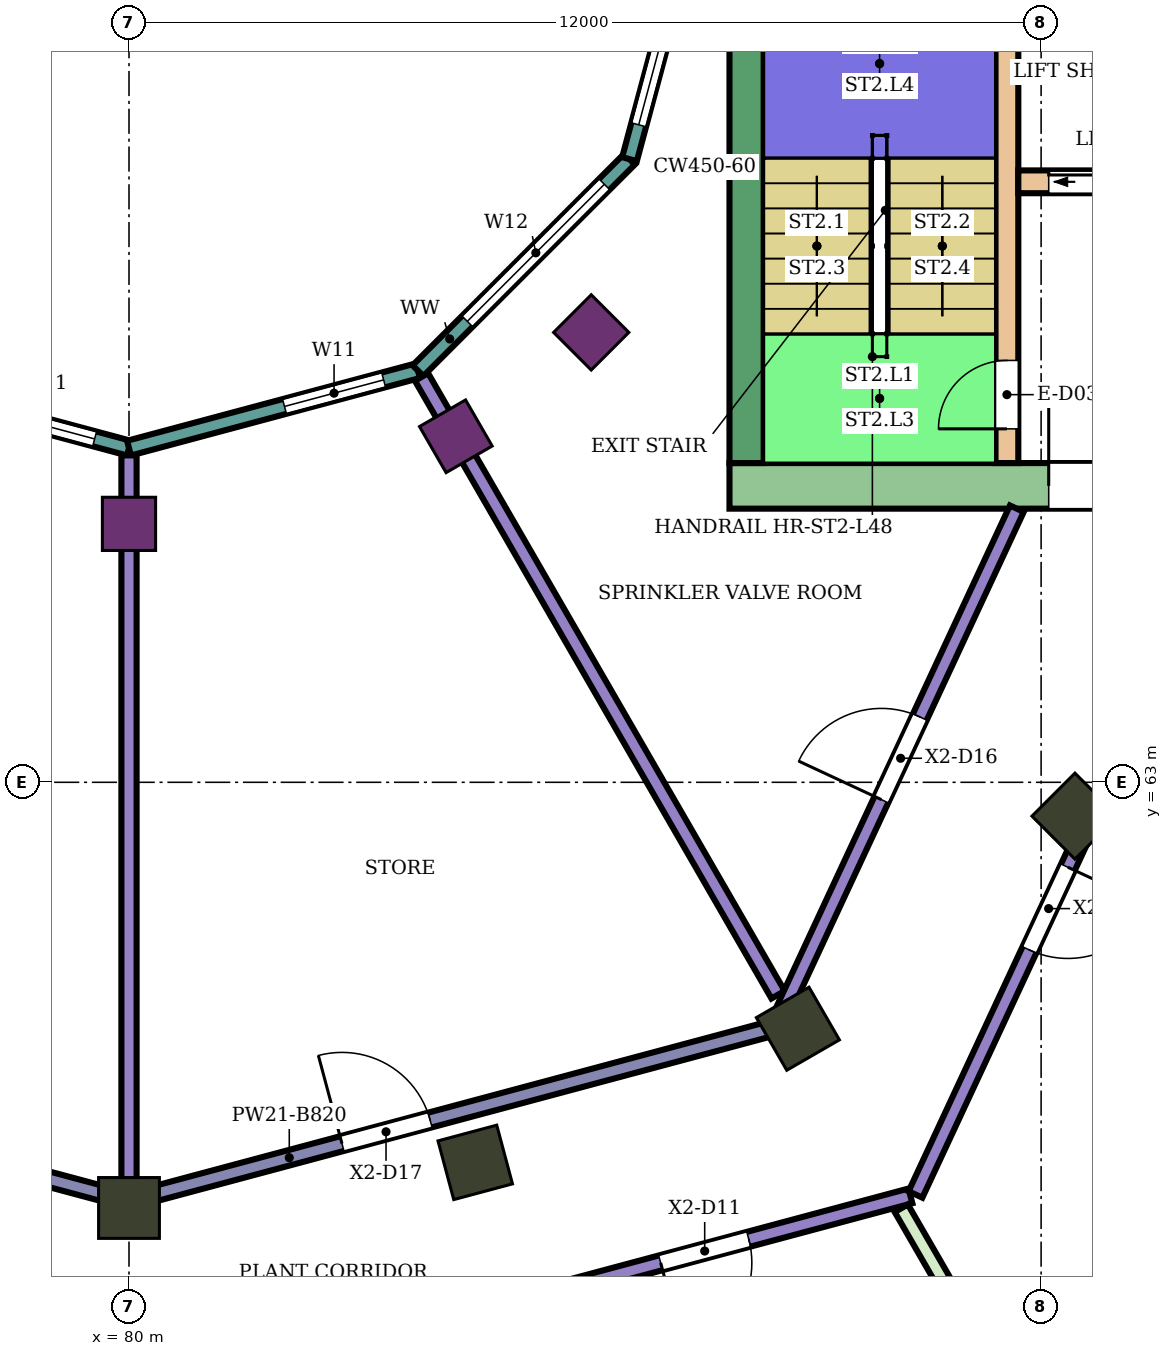
"""IFC4 building model, lengths in metres.
Left out: names, types, materials, properties, quantities, classifications, styles, units other than length and angle.
Written with IfcOpenShell. Run it as: python <this file> out.ifc"""

import sys

from ifc_helpers import new_model, si_unit, direction, frame, frame_2d, origin, origin_2d, place, context, subcontext, project, spatial, rectangle, extrude, element, fill, save


model = new_model("IFC4")
c1 = context("Model", 3, precision=1e-05, world=origin(), true_north=direction((0.0, 1.0)))
c2 = subcontext(c1, "Body", "Model", "MODEL_VIEW")
j1 = project(units=[si_unit("LENGTHUNIT", "METRE"), si_unit("PLANEANGLEUNIT", "RADIAN")], contexts=[c1])
p1 = place(None, origin())
s1 = spatial("IfcSite", under=j1, at=p1, CompositionType="ELEMENT")
p2 = place(p1, origin())
s2 = spatial("IfcBuilding", under=s1, at=p2, CompositionType="ELEMENT")
p3 = place(p2, frame((0.0, 0.0, 206.9)))
s3 = spatial("IfcBuildingStorey", under=s2, at=p3, CompositionType="ELEMENT", Elevation=206.9)
for number, where, z_axis, x_axis in (
    (1, (80.0, 57.4, 0.0), (0.0, 0.0, 1.0), (0.0, -1.0, 0.0)),
    (2, (84.555, 58.0, 0.0), (0.0, 0.0, 1.0), (0.259, -0.966, 0.0)),
    (3, (88.8, 59.758, 0.0), (0.0, 0.0, 1.0), (0.5, -0.866, 0.0)),
    (4, (92.445, 62.555, 0.0), (0.0, 0.0, 1.0), (0.707, -0.707, 0.0)),
):
    element("IfcColumn", number, at=place(p3, frame(where, z_axis=z_axis, x_axis=x_axis)), inside=s3, PredefinedType="COLUMN", context=c2, shape_type="SweptSolid", body=[
        extrude(rectangle(XDim=0.8, YDim=0.8, at=origin_2d()), origin(), (0.0, 0.0, 1.0), 5.6),
    ])
for number, where, z_axis, x_axis in (
    (5, (80.0, 66.4, 0.0), (0.0, 0.0, 1.0), (0.0, -1.0, 0.0)),
    (6, (84.3, 67.552, 0.0), (0.0, 0.0, 1.0), (0.5, -0.866, 0.0)),
    (7, (86.081, 68.919, 0.0), (0.0, 0.0, 1.0), (0.707, -0.707, 0.0)),
):
    element("IfcColumn", number, at=place(p3, frame(where, z_axis=z_axis, x_axis=x_axis)), inside=s3, PredefinedType="COLUMN", context=c2, shape_type="SweptSolid", body=[
        extrude(rectangle(XDim=0.7, YDim=0.7, at=origin_2d()), origin(), (0.0, 0.0, 1.0), 5.6),
    ])
p4 = place(p3, frame((87.9, 66.9, 0.0), z_axis=(0.0, 0.0, 1.0), x_axis=(1.0, 0.0, 0.0)))
e8 = element("IfcWall", 8, at=p4, inside=s3, PredefinedType="SHEAR", context=c2, shape_type="SweptSolid", body=[
    extrude(rectangle(XDim=14.9, YDim=0.6, at=frame_2d((7.45, 0.0))), origin(), (0.0, 0.0, 1.0), 5.28),
])
p5 = place(p4, frame((4.2, 0.0, 0.0)))
e9 = element("IfcOpeningElement", 9, at=p5, cuts=e8, PredefinedType="OPENING", context=c2, shape_type="SweptSolid", body=[
    extrude(rectangle(XDim=2.4, YDim=2.4, at=frame_2d((1.2, 1.2))), frame((0.0, 0.31, 0.0), z_axis=(0.0, -1.0, 0.0), x_axis=(1.0, 0.0, 0.0)), (0.0, 0.0, 1.0), 0.62),
])
p6 = place(p3, frame((88.125, 67.2, 0.0), z_axis=(0.0, 0.0, 1.0), x_axis=(0.0, 1.0, 0.0)))
e10 = element("IfcWall", 10, at=p6, inside=s3, PredefinedType="SHEAR", context=c2, shape_type="SweptSolid", body=[
    extrude(rectangle(XDim=7.8, YDim=0.45, at=frame_2d((3.9, 0.0))), origin(), (0.0, 0.0, 1.0), 5.28),
])
p7 = place(p3, frame((91.55, 67.2, 0.0), z_axis=(0.0, 0.0, 1.0), x_axis=(0.0, 1.0, 0.0)))
e11 = element("IfcWall", 11, at=p7, inside=s3, PredefinedType="SHEAR", context=c2, shape_type="SweptSolid", body=[
    extrude(rectangle(XDim=7.8, YDim=0.3, at=frame_2d((3.9, 0.0))), origin(), (0.0, 0.0, 1.0), 5.28),
])
p8 = place(p7, frame((0.45, 0.0, 0.0)))
e12 = element("IfcOpeningElement", 12, at=p8, cuts=e11, PredefinedType="OPENING", context=c2, shape_type="SweptSolid", body=[
    extrude(rectangle(XDim=0.9, YDim=2.1, at=frame_2d((0.45, 1.05))), frame((0.0, 0.16, 0.0), z_axis=(0.0, -1.0, 0.0), x_axis=(1.0, 0.0, 0.0)), (0.0, 0.0, 1.0), 0.32),
])
p9 = place(p3, frame((91.7, 70.9, 0.0), z_axis=(0.0, 0.0, 1.0), x_axis=(1.0, 0.0, 0.0)))
e13 = element("IfcWall", 13, at=p9, inside=s3, PredefinedType="SHEAR", context=c2, shape_type="SweptSolid", body=[
    extrude(rectangle(XDim=11.1, YDim=0.3, at=frame_2d((5.55, 0.0))), origin(), (0.0, 0.0, 1.0), 5.28),
])
p10 = place(p9, frame((0.4, 0.0, 0.0)))
e14 = element("IfcOpeningElement", 14, at=p10, cuts=e13, PredefinedType="OPENING", context=c2, shape_type="SweptSolid", body=[
    extrude(rectangle(XDim=1.4, YDim=2.1, at=frame_2d((0.7, 1.05))), frame((0.0, 0.16, 0.0), z_axis=(0.0, -1.0, 0.0), x_axis=(1.0, 0.0, 0.0)), (0.0, 0.0, 1.0), 0.32),
])
p11 = place(p9, frame((3.0, 0.0, 0.0)))
e15 = element("IfcOpeningElement", 15, at=p11, cuts=e13, PredefinedType="OPENING", context=c2, shape_type="SweptSolid", body=[
    extrude(rectangle(XDim=1.2, YDim=2.1, at=frame_2d((0.6, 1.05))), frame((0.0, 0.16, 0.0), z_axis=(0.0, -1.0, 0.0), x_axis=(1.0, 0.0, 0.0)), (0.0, 0.0, 1.0), 0.32),
])
p12 = place(p9, frame((6.075, 0.0, 0.0)))
e16 = element("IfcOpeningElement", 16, at=p12, cuts=e13, PredefinedType="OPENING", context=c2, shape_type="SweptSolid", body=[
    extrude(rectangle(XDim=0.9, YDim=2.1, at=frame_2d((0.45, 1.05))), frame((0.0, 0.16, 0.0), z_axis=(0.0, -1.0, 0.0), x_axis=(1.0, 0.0, 0.0)), (0.0, 0.0, 1.0), 0.32),
])
p13 = place(p9, frame((9.125, 0.0, 0.0)))
e17 = element("IfcOpeningElement", 17, at=p13, cuts=e13, PredefinedType="OPENING", context=c2, shape_type="SweptSolid", body=[
    extrude(rectangle(XDim=0.9, YDim=2.1, at=frame_2d((0.45, 1.05))), frame((0.0, 0.16, 0.0), z_axis=(0.0, -1.0, 0.0), x_axis=(1.0, 0.0, 0.0)), (0.0, 0.0, 1.0), 0.32),
])
p14 = place(p3, frame((76.198, 68.415, 0.0), z_axis=(0.0, 0.0, 1.0), x_axis=(0.965933654434, -0.258789828301, 0.0)))
e18 = element("IfcWall", 18, at=p14, inside=s3, PredefinedType="NOTDEFINED", context=c2, shape_type="SweptSolid", body=[
    extrude(rectangle(XDim=3.936, YDim=0.2, at=frame_2d((1.968, 0.0))), origin(), (0.0, 0.0, 1.0), 5.6),
])
p15 = place(p14, frame((2.118, 0.0, 0.9)))
e19 = element("IfcOpeningElement", 19, at=p15, cuts=e18, PredefinedType="OPENING", context=c2, shape_type="SweptSolid", body=[
    extrude(rectangle(XDim=1.35, YDim=2.3, at=frame_2d((0.675, 1.15))), frame((0.0, 0.11, 0.0), z_axis=(0.0, -1.0, 0.0), x_axis=(1.0, 0.0, 0.0)), (0.0, 0.0, 1.0), 0.22),
])
p16 = place(p3, frame((80.0, 67.396, 0.0), z_axis=(0.0, 0.0, 1.0), x_axis=(0.965933654434, 0.258789828301, 0.0)))
e20 = element("IfcWall", 20, at=p16, inside=s3, PredefinedType="NOTDEFINED", context=c2, shape_type="SweptSolid", body=[
    extrude(rectangle(XDim=3.936, YDim=0.2, at=frame_2d((1.968, 0.0))), origin(), (0.0, 0.0, 1.0), 5.6),
])
p17 = place(p16, frame((2.118, 0.0, 0.9)))
e21 = element("IfcOpeningElement", 21, at=p17, cuts=e20, PredefinedType="OPENING", context=c2, shape_type="SweptSolid", body=[
    extrude(rectangle(XDim=1.35, YDim=2.3, at=frame_2d((0.675, 1.15))), frame((0.0, 0.11, 0.0), z_axis=(0.0, -1.0, 0.0), x_axis=(1.0, 0.0, 0.0)), (0.0, 0.0, 1.0), 0.22),
])
p18 = place(p3, frame((83.802, 68.415, 0.0), z_axis=(0.0, 0.0, 1.0), x_axis=(0.707106781187, 0.707106781187, 0.0)))
e22 = element("IfcWall", 22, at=p18, inside=s3, PredefinedType="NOTDEFINED", context=c2, shape_type="SweptSolid", body=[
    extrude(rectangle(XDim=3.936, YDim=0.2, at=frame_2d((1.968, 0.0))), origin(), (0.0, 0.0, 1.0), 5.6),
])
p19 = place(p18, frame((0.918, 0.0, 0.9)))
e23 = element("IfcOpeningElement", 23, at=p19, cuts=e22, PredefinedType="OPENING", context=c2, shape_type="SweptSolid", body=[
    extrude(rectangle(XDim=2.55, YDim=2.3, at=frame_2d((1.275, 1.15))), frame((0.0, 0.11, 0.0), z_axis=(0.0, -1.0, 0.0), x_axis=(1.0, 0.0, 0.0)), (0.0, 0.0, 1.0), 0.22),
])
p20 = place(p3, frame((86.585, 71.198, 0.0), z_axis=(0.0, 0.0, 1.0), x_axis=(0.258789828301, 0.965933654434, 0.0)))
e24 = element("IfcWall", 24, at=p20, inside=s3, PredefinedType="NOTDEFINED", context=c2, shape_type="SweptSolid", body=[
    extrude(rectangle(XDim=3.936, YDim=0.2, at=frame_2d((1.968, 0.0))), origin(), (0.0, 0.0, 1.0), 5.6),
])
p21 = place(p20, frame((0.468, 0.0, 0.9)))
e25 = element("IfcOpeningElement", 25, at=p21, cuts=e24, PredefinedType="OPENING", context=c2, shape_type="SweptSolid", body=[
    extrude(rectangle(XDim=3.0, YDim=2.3, at=frame_2d((1.5, 1.15))), frame((0.0, 0.11, 0.0), z_axis=(0.0, -1.0, 0.0), x_axis=(1.0, 0.0, 0.0)), (0.0, 0.0, 1.0), 0.22),
])
p22 = place(p3, frame((69.652, 57.577, 0.0), z_axis=(0.0, 0.0, 1.0), x_axis=(0.965914220364, -0.25886235512, 0.0)))
e26 = element("IfcWall", 26, at=p22, inside=s3, PredefinedType="PARTITIONING", context=c2, shape_type="SweptSolid", body=[
    extrude(rectangle(XDim=10.663, YDim=0.2, at=frame_2d((5.332, 0.0))), origin(), (0.0, 0.0, 1.0), 5.15),
])
p23 = place(p22, frame((7.54, 0.0, 0.0)))
e27 = element("IfcOpeningElement", 27, at=p23, cuts=e26, PredefinedType="OPENING", context=c2, shape_type="SweptSolid", body=[
    extrude(rectangle(XDim=1.1, YDim=2.1, at=frame_2d((0.55, 1.05))), frame((0.0, 0.11, 0.0), z_axis=(0.0, -1.0, 0.0), x_axis=(1.0, 0.0, 0.0)), (0.0, 0.0, 1.0), 0.22),
])
p24 = place(p22, frame((2.272, 0.0, 0.0)))
e28 = element("IfcOpeningElement", 28, at=p24, cuts=e26, PredefinedType="OPENING", context=c2, shape_type="SweptSolid", body=[
    extrude(rectangle(XDim=1.2, YDim=2.4, at=frame_2d((0.6, 1.2))), frame((0.0, 0.11, 0.0), z_axis=(0.0, -1.0, 0.0), x_axis=(1.0, 0.0, 0.0)), (0.0, 0.0, 1.0), 0.22),
])
p25 = place(p3, frame((71.498, 59.774, 0.0), z_axis=(0.0, 0.0, 1.0), x_axis=(0.965928196674, -0.258810198543, 0.0)))
e29 = element("IfcWall", 29, at=p25, inside=s3, PredefinedType="PARTITIONING", context=c2, shape_type="SweptSolid", body=[
    extrude(rectangle(XDim=8.672, YDim=0.2, at=frame_2d((4.336, 0.0))), origin(), (0.0, 0.0, 1.0), 4.78),
])
p26 = place(p25, frame((4.701, 0.0, 0.0)))
e30 = element("IfcOpeningElement", 30, at=p26, cuts=e29, PredefinedType="OPENING", context=c2, shape_type="SweptSolid", body=[
    extrude(rectangle(XDim=1.2, YDim=2.4, at=frame_2d((0.6, 1.2))), frame((0.0, 0.11, 0.0), z_axis=(0.0, -1.0, 0.0), x_axis=(1.0, 0.0, 0.0)), (0.0, 0.0, 1.0), 0.22),
])
p27 = place(p3, frame((80.0, 54.804, 0.0), z_axis=(0.0, 0.0, 1.0), x_axis=(0.965920507456, 0.258838894444, 0.0)))
e31 = element("IfcWall", 31, at=p27, inside=s3, PredefinedType="PARTITIONING", context=c2, shape_type="SweptSolid", body=[
    extrude(rectangle(XDim=10.643, YDim=0.2, at=frame_2d((5.322, 0.0))), origin(), (0.0, 0.0, 1.0), 5.15),
])
p28 = place(p27, frame((7.241, 0.0, 0.0)))
e32 = element("IfcOpeningElement", 32, at=p28, cuts=e31, PredefinedType="OPENING", context=c2, shape_type="SweptSolid", body=[
    extrude(rectangle(XDim=1.2, YDim=2.4, at=frame_2d((0.6, 1.2))), frame((0.0, 0.11, 0.0), z_axis=(0.0, -1.0, 0.0), x_axis=(1.0, 0.0, 0.0)), (0.0, 0.0, 1.0), 0.22),
])
p29 = place(p3, frame((80.0, 57.626, 0.0), z_axis=(0.0, 0.0, 1.0), x_axis=(0.0, 1.0, 0.0)))
e33 = element("IfcWall", 33, at=p29, inside=s3, PredefinedType="PARTITIONING", context=c2, shape_type="SweptSolid", body=[
    extrude(rectangle(XDim=9.675, YDim=0.2, at=frame_2d((4.837, 0.0))), origin(), (0.0, 0.0, 1.0), 5.15),
])
p30 = place(p3, frame((80.0, 57.496, 0.0), z_axis=(0.0, 0.0, 1.0), x_axis=(0.965931702874, 0.258797112392, 0.0)))
e34 = element("IfcWall", 34, at=p30, inside=s3, PredefinedType="PARTITIONING", context=c2, shape_type="SweptSolid", body=[
    extrude(rectangle(XDim=8.732, YDim=0.2, at=frame_2d((4.366, 0.0))), origin(), (0.0, 0.0, 1.0), 4.78),
])
p31 = place(p30, frame((2.901, 0.0, 0.0)))
e35 = element("IfcOpeningElement", 35, at=p31, cuts=e34, PredefinedType="OPENING", context=c2, shape_type="SweptSolid", body=[
    extrude(rectangle(XDim=1.2, YDim=2.4, at=frame_2d((0.6, 1.2))), frame((0.0, 0.11, 0.0), z_axis=(0.0, -1.0, 0.0), x_axis=(1.0, 0.0, 0.0)), (0.0, 0.0, 1.0), 0.22),
])
p32 = place(p3, frame((83.848, 68.333, 0.0), z_axis=(0.0, 0.0, 1.0), x_axis=(0.499897383715, -0.866084641219, 0.0)))
e36 = element("IfcWall", 36, at=p32, inside=s3, PredefinedType="PARTITIONING", context=c2, shape_type="SweptSolid", body=[
    extrude(rectangle(XDim=9.383, YDim=0.2, at=frame_2d((4.692, 0.0))), origin(), (0.0, 0.0, 1.0), 5.15),
])
p33 = place(p3, frame((88.502, 59.774, 0.0), z_axis=(0.0, 0.0, 1.0), x_axis=(0.422164659646, 0.906519167004, 0.0)))
e37 = element("IfcWall", 37, at=p33, inside=s3, PredefinedType="PARTITIONING", context=c2, shape_type="SweptSolid", body=[
    extrude(rectangle(XDim=7.53, YDim=0.2, at=frame_2d((3.765, 0.0))), origin(), (0.0, 0.0, 1.0), 5.15),
])
p34 = place(p33, frame((3.308, 0.0, 0.0)))
e38 = element("IfcOpeningElement", 38, at=p34, cuts=e37, PredefinedType="OPENING", context=c2, shape_type="SweptSolid", body=[
    extrude(rectangle(XDim=1.2, YDim=2.4, at=frame_2d((0.6, 1.2))), frame((0.0, 0.11, 0.0), z_axis=(0.0, -1.0, 0.0), x_axis=(1.0, 0.0, 0.0)), (0.0, 0.0, 1.0), 0.22),
])
p35 = place(p3, frame((90.161, 57.396, 0.0), z_axis=(0.0, 0.0, 1.0), x_axis=(0.499911747244, -0.866076350542, 0.0)))
e39 = element("IfcWall", 39, at=p35, inside=s3, PredefinedType="PARTITIONING", context=c2, shape_type="SweptSolid", body=[
    extrude(rectangle(XDim=5.471, YDim=0.2, at=frame_2d((2.735, 0.0))), origin(), (0.0, 0.0, 1.0), 4.667),
])
p36 = place(p3, frame((90.347, 57.577, 0.0), z_axis=(0.0, 0.0, 1.0), x_axis=(0.422271497137, 0.906469405278, 0.0)))
e40 = element("IfcWall", 40, at=p36, inside=s3, PredefinedType="PARTITIONING", context=c2, shape_type="SweptSolid", body=[
    extrude(rectangle(XDim=8.208, YDim=0.2, at=frame_2d((4.104, 0.0))), origin(), (0.0, 0.0, 1.0), 5.15),
])
p37 = place(p36, frame((3.549, 0.0, 0.0)))
e41 = element("IfcOpeningElement", 41, at=p37, cuts=e40, PredefinedType="OPENING", context=c2, shape_type="SweptSolid", body=[
    extrude(rectangle(XDim=1.2, YDim=2.4, at=frame_2d((0.6, 1.2))), frame((0.0, 0.11, 0.0), z_axis=(0.0, -1.0, 0.0), x_axis=(1.0, 0.0, 0.0)), (0.0, 0.0, 1.0), 0.22),
])
p38 = place(p15, origin())
e42 = element("IfcWindow", 42, at=p38, inside=s3, PartitioningType="SINGLE_PANEL", PredefinedType="WINDOW", context=c2, shape_type="SweptSolid", body=[
    extrude(rectangle(XDim=1.35, YDim=2.3, at=frame_2d((0.675, 1.15))), frame((0.0, 0.03, 0.0), z_axis=(0.0, -1.0, 0.0), x_axis=(1.0, 0.0, 0.0)), (0.0, 0.0, 1.0), 0.06),
])
fill(e19, e42)
p39 = place(p17, origin())
e43 = element("IfcWindow", 43, at=p39, inside=s3, PartitioningType="SINGLE_PANEL", PredefinedType="WINDOW", context=c2, shape_type="SweptSolid", body=[
    extrude(rectangle(XDim=1.35, YDim=2.3, at=frame_2d((0.675, 1.15))), frame((0.0, 0.03, 0.0), z_axis=(0.0, -1.0, 0.0), x_axis=(1.0, 0.0, 0.0)), (0.0, 0.0, 1.0), 0.06),
])
fill(e21, e43)
p40 = place(p19, origin())
e44 = element("IfcWindow", 44, at=p40, inside=s3, PartitioningType="SINGLE_PANEL", PredefinedType="WINDOW", context=c2, shape_type="SweptSolid", body=[
    extrude(rectangle(XDim=2.55, YDim=2.3, at=frame_2d((1.275, 1.15))), frame((0.0, 0.03, 0.0), z_axis=(0.0, -1.0, 0.0), x_axis=(1.0, 0.0, 0.0)), (0.0, 0.0, 1.0), 0.06),
])
fill(e23, e44)
p41 = place(p21, origin())
e45 = element("IfcWindow", 45, at=p41, inside=s3, PartitioningType="SINGLE_PANEL", PredefinedType="WINDOW", context=c2, shape_type="SweptSolid", body=[
    extrude(rectangle(XDim=3.0, YDim=2.3, at=frame_2d((1.5, 1.15))), frame((0.0, 0.03, 0.0), z_axis=(0.0, -1.0, 0.0), x_axis=(1.0, 0.0, 0.0)), (0.0, 0.0, 1.0), 0.06),
])
fill(e25, e45)
p42 = place(p37, frame((1.2, 0.0, 0.0), z_axis=(0.0, 0.0, 1.0), x_axis=(-1.0, 0.0, 0.0)))
e46 = element("IfcDoor", 46, at=p42, inside=s3, OperationType="SINGLE_SWING_LEFT", PredefinedType="DOOR", context=c2, shape_type="SweptSolid", body=[
    extrude(rectangle(XDim=1.2, YDim=2.4, at=frame_2d((0.6, 1.2))), frame((0.0, 0.025, 0.0), z_axis=(0.0, -1.0, 0.0), x_axis=(1.0, 0.0, 0.0)), (0.0, 0.0, 1.0), 0.05),
])
fill(e41, e46)
p43 = place(p28, frame((1.2, 0.0, 0.0), z_axis=(0.0, 0.0, 1.0), x_axis=(-1.0, 0.0, 0.0)))
e47 = element("IfcDoor", 47, at=p43, inside=s3, OperationType="SINGLE_SWING_RIGHT", PredefinedType="DOOR", context=c2, shape_type="SweptSolid", body=[
    extrude(rectangle(XDim=1.2, YDim=2.4, at=frame_2d((0.6, 1.2))), frame((0.0, 0.025, 0.0), z_axis=(0.0, -1.0, 0.0), x_axis=(1.0, 0.0, 0.0)), (0.0, 0.0, 1.0), 0.05),
])
fill(e32, e47)
p44 = place(p34, origin())
e48 = element("IfcDoor", 48, at=p44, inside=s3, OperationType="SINGLE_SWING_LEFT", PredefinedType="DOOR", context=c2, shape_type="SweptSolid", body=[
    extrude(rectangle(XDim=1.2, YDim=2.4, at=frame_2d((0.6, 1.2))), frame((0.0, 0.025, 0.0), z_axis=(0.0, -1.0, 0.0), x_axis=(1.0, 0.0, 0.0)), (0.0, 0.0, 1.0), 0.05),
])
fill(e38, e48)
p45 = place(p31, origin())
e49 = element("IfcDoor", 49, at=p45, inside=s3, OperationType="SINGLE_SWING_LEFT", PredefinedType="DOOR", context=c2, shape_type="SweptSolid", body=[
    extrude(rectangle(XDim=1.2, YDim=2.4, at=frame_2d((0.6, 1.2))), frame((0.0, 0.025, 0.0), z_axis=(0.0, -1.0, 0.0), x_axis=(1.0, 0.0, 0.0)), (0.0, 0.0, 1.0), 0.05),
])
fill(e35, e49)
p46 = place(p8, origin())
e50 = element("IfcDoor", 50, at=p46, inside=s3, OperationType="SINGLE_SWING_LEFT", PredefinedType="DOOR", context=c2, shape_type="SweptSolid", body=[
    extrude(rectangle(XDim=0.9, YDim=2.1, at=frame_2d((0.45, 1.05))), frame((0.0, 0.025, 0.0), z_axis=(0.0, -1.0, 0.0), x_axis=(1.0, 0.0, 0.0)), (0.0, 0.0, 1.0), 0.05),
])
fill(e12, e50)
p47 = place(p10, origin())
e51 = element("IfcDoor", 51, at=p47, inside=s3, OperationType="DOUBLE_DOOR_SLIDING", PredefinedType="DOOR", context=c2, shape_type="SweptSolid", body=[
    extrude(rectangle(XDim=1.4, YDim=2.1, at=frame_2d((0.7, 1.05))), frame((0.0, 0.025, 0.0), z_axis=(0.0, -1.0, 0.0), x_axis=(1.0, 0.0, 0.0)), (0.0, 0.0, 1.0), 0.05),
])
fill(e14, e51)
p48 = place(p5, origin())
e52 = element("IfcDoor", 52, at=p48, inside=s3, OperationType="DOUBLE_DOOR_SINGLE_SWING", PredefinedType="DOOR", context=c2, shape_type="SweptSolid", body=[
    extrude(rectangle(XDim=2.4, YDim=2.4, at=frame_2d((1.2, 1.2))), frame((0.0, 0.025, 0.0), z_axis=(0.0, -1.0, 0.0), x_axis=(1.0, 0.0, 0.0)), (0.0, 0.0, 1.0), 0.05),
])
fill(e9, e52)
save(model, sys.argv[1])
